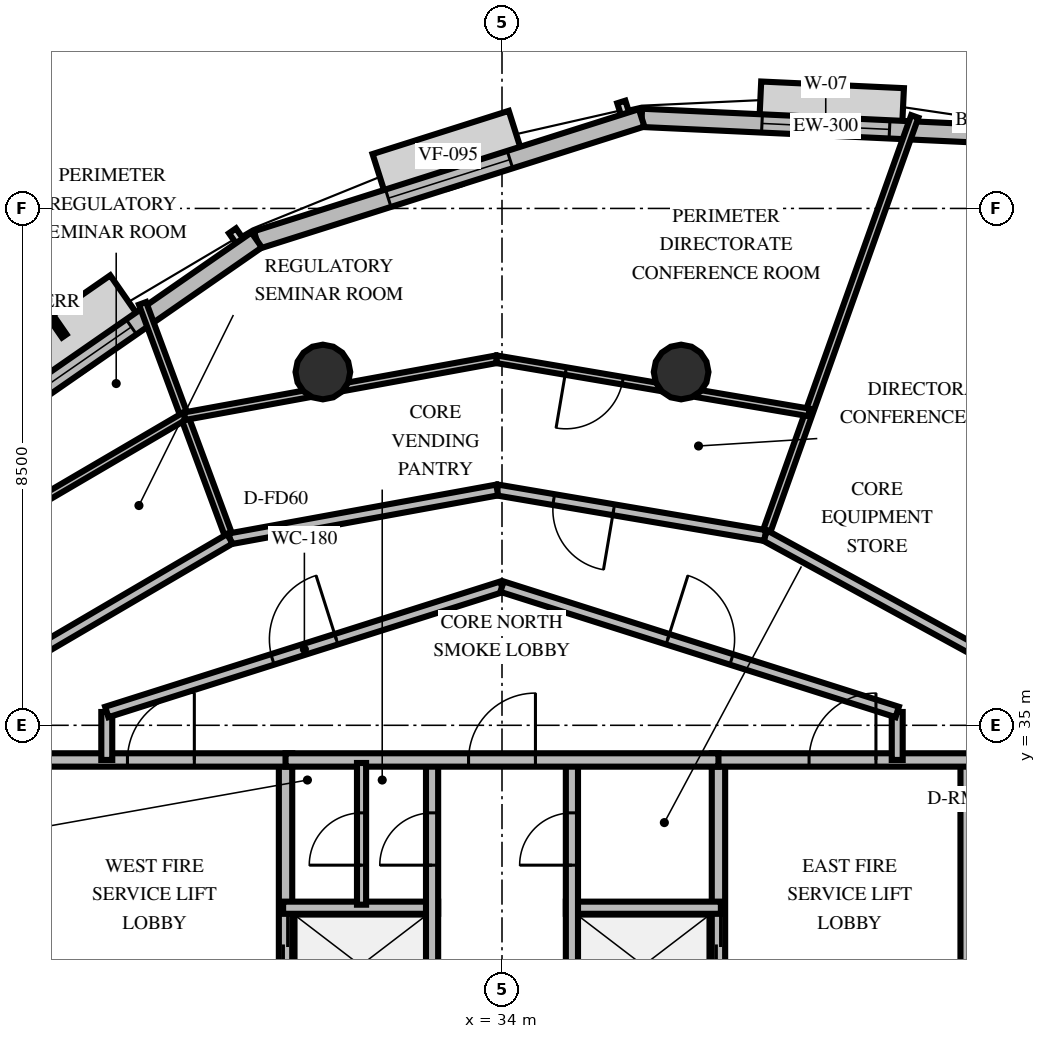
"""IFC4 building model, lengths in metres.
Left out: names, types, materials, properties, quantities, classifications, styles, units other than length and angle.
Written with IfcOpenShell. Run it as: python <this file> out.ifc"""

import sys

from ifc_helpers import new_model, si_unit, direction, frame, frame_2d, origin, origin_2d, place, context, subcontext, project, spatial, rectangle, circle, extrude, element, fill, save


model = new_model("IFC4")
c1 = context("Model", 3, precision=1e-05, world=origin(), true_north=direction((0.0, 1.0)))
c2 = subcontext(c1, "Body", "Model", "MODEL_VIEW")
j1 = project(units=[si_unit("LENGTHUNIT", "METRE"), si_unit("PLANEANGLEUNIT", "RADIAN")], contexts=[c1])
p1 = place(None, origin())
s1 = spatial("IfcSite", under=j1, at=p1, CompositionType="ELEMENT")
p2 = place(p1, origin())
s2 = spatial("IfcBuilding", under=s1, at=p2, CompositionType="ELEMENT")
p3 = place(p2, frame((0.0, 0.0, 241.2)))
s3 = spatial("IfcBuildingStorey", under=s2, at=p3, CompositionType="ELEMENT", Elevation=241.2)
for number, where, z_axis, x_axis in (
    (1, (36.946, 40.81, 0.0), (0.0, 0.0, 1.0), (1.0, 0.0, 0.0)),
    (2, (31.054, 40.81, 0.0), (0.0, 0.0, 1.0), (1.0, 0.0, 0.0)),
):
    element("IfcColumn", number, at=place(p3, frame(where, z_axis=z_axis, x_axis=x_axis)), inside=s3, PredefinedType="COLUMN", context=c2, shape_type="SweptSolid", body=[
        extrude(circle(Radius=0.45, at=origin_2d()), origin(), (0.0, 0.0, 1.0), 3.6),
    ])
p4 = place(p3, frame((42.352, 44.708, 0.0), z_axis=(0.0, 0.0, 1.0), x_axis=(-0.998917432733, 0.046518411209, 0.0)))
e3 = element("IfcWall", 3, at=p4, inside=s3, PredefinedType="SOLIDWALL", context=c2, shape_type="SweptSolid", body=[
    extrude(rectangle(XDim=6.062, YDim=0.3, at=frame_2d((3.031, 0.0))), origin(), (0.0, 0.0, 1.0), 2.76),
])
p5 = place(p4, frame((1.981, 0.0, 0.8)))
e4 = element("IfcOpeningElement", 4, at=p5, cuts=e3, PredefinedType="OPENING", context=c2, shape_type="SweptSolid", body=[
    extrude(rectangle(XDim=2.1, YDim=1.85, at=frame_2d((1.05, 0.925))), frame((0.0, 0.16, 0.0), z_axis=(0.0, -1.0, 0.0), x_axis=(1.0, 0.0, 0.0)), (0.0, 0.0, 1.0), 0.32),
])
p6 = place(p3, frame((36.297, 44.99, 0.0), z_axis=(0.0, 0.0, 1.0), x_axis=(-0.953208683958, -0.302313090729, 0.0)))
e5 = element("IfcWall", 5, at=p6, inside=s3, PredefinedType="SOLIDWALL", context=c2, shape_type="SweptSolid", body=[
    extrude(rectangle(XDim=6.643, YDim=0.3, at=frame_2d((3.322, 0.0))), origin(), (0.0, 0.0, 1.0), 2.76),
])
p7 = place(p6, frame((2.272, 0.0, 0.8)))
e6 = element("IfcOpeningElement", 6, at=p7, cuts=e5, PredefinedType="OPENING", context=c2, shape_type="SweptSolid", body=[
    extrude(rectangle(XDim=2.1, YDim=1.85, at=frame_2d((1.05, 0.925))), frame((0.0, 0.16, 0.0), z_axis=(0.0, -1.0, 0.0), x_axis=(1.0, 0.0, 0.0)), (0.0, 0.0, 1.0), 0.32),
])
p8 = place(p3, frame((29.965, 42.981, 0.0), z_axis=(0.0, 0.0, 1.0), x_axis=(-0.821575322213, -0.570099982399, 0.0)))
e7 = element("IfcWall", 7, at=p8, inside=s3, PredefinedType="SOLIDWALL", context=c2, shape_type="SweptSolid", body=[
    extrude(rectangle(XDim=7.115, YDim=0.3, at=frame_2d((3.558, 0.0))), origin(), (0.0, 0.0, 1.0), 2.76),
])
p9 = place(p8, frame((2.508, 0.0, 0.8)))
e8 = element("IfcOpeningElement", 8, at=p9, cuts=e7, PredefinedType="OPENING", context=c2, shape_type="SweptSolid", body=[
    extrude(rectangle(XDim=2.1, YDim=1.85, at=frame_2d((1.05, 0.925))), frame((0.0, 0.16, 0.0), z_axis=(0.0, -1.0, 0.0), x_axis=(1.0, 0.0, 0.0)), (0.0, 0.0, 1.0), 0.32),
])
p10 = place(p3, frame((30.44, 30.05, 0.0), z_axis=(0.0, 0.0, 1.0), x_axis=(0.0, 1.0, 0.0)))
e9 = element("IfcWall", 9, at=p10, inside=s3, PredefinedType="SOLIDWALL", context=c2, shape_type="SweptSolid", body=[
    extrude(rectangle(XDim=4.38, YDim=0.22, at=frame_2d((2.19, 0.0))), origin(), (0.0, 0.0, 1.0), 2.46),
])
p11 = place(p10, frame((0.8, 0.0, 0.0)))
e10 = element("IfcOpeningElement", 10, at=p11, cuts=e9, PredefinedType="OPENING", context=c2, shape_type="SweptSolid", body=[
    extrude(rectangle(XDim=1.05, YDim=2.1, at=frame_2d((0.525, 1.05))), frame((0.0, 0.12, 0.0), z_axis=(0.0, -1.0, 0.0), x_axis=(1.0, 0.0, 0.0)), (0.0, 0.0, 1.0), 0.24),
])
p12 = place(p3, frame((26.24, 34.43, 0.0), z_axis=(0.0, 0.0, 1.0), x_axis=(1.0, 0.0, 0.0)))
e11 = element("IfcWall", 11, at=p12, inside=s3, PredefinedType="SOLIDWALL", context=c2, shape_type="SweptSolid", body=[
    extrude(rectangle(XDim=4.31, YDim=0.22, at=frame_2d((2.155, 0.0))), origin(), (0.0, 0.0, 1.0), 2.46),
])
p13 = place(p12, frame((1.6, 0.0, 0.0)))
e12 = element("IfcOpeningElement", 12, at=p13, cuts=e11, PredefinedType="OPENING", context=c2, shape_type="SweptSolid", body=[
    extrude(rectangle(XDim=1.1, YDim=2.15, at=frame_2d((0.55, 1.075))), frame((0.0, 0.12, 0.0), z_axis=(0.0, -1.0, 0.0), x_axis=(1.0, 0.0, 0.0)), (0.0, 0.0, 1.0), 0.24),
])
p14 = place(p3, frame((30.4, 32.0, 0.0), z_axis=(0.0, 0.0, 1.0), x_axis=(1.0, 0.0, 0.0)))
e13 = element("IfcWall", 13, at=p14, inside=s3, PredefinedType="SOLIDWALL", context=c2, shape_type="SweptSolid", body=[
    extrude(rectangle(XDim=2.55, YDim=0.2, at=frame_2d((1.275, 0.0))), origin(), (0.0, 0.0, 1.0), 2.46),
])
p15 = place(p3, frame((32.85, 30.05, 0.0), z_axis=(0.0, 0.0, 1.0), x_axis=(0.0, 1.0, 0.0)))
e14 = element("IfcWall", 14, at=p15, inside=s3, PredefinedType="SOLIDWALL", context=c2, shape_type="SweptSolid", body=[
    extrude(rectangle(XDim=4.38, YDim=0.2, at=frame_2d((2.19, 0.0))), origin(), (0.0, 0.0, 1.0), 2.46),
])
p16 = place(p15, frame((2.65, 0.0, 0.0)))
e15 = element("IfcOpeningElement", 15, at=p16, cuts=e14, PredefinedType="OPENING", context=c2, shape_type="SweptSolid", body=[
    extrude(rectangle(XDim=0.86, YDim=2.05, at=frame_2d((0.43, 1.025))), frame((0.0, 0.11, 0.0), z_axis=(0.0, -1.0, 0.0), x_axis=(1.0, 0.0, 0.0)), (0.0, 0.0, 1.0), 0.22),
])
p17 = place(p3, frame((37.56, 30.05, 0.0), z_axis=(0.0, 0.0, 1.0), x_axis=(0.0, 1.0, 0.0)))
e16 = element("IfcWall", 16, at=p17, inside=s3, PredefinedType="SOLIDWALL", context=c2, shape_type="SweptSolid", body=[
    extrude(rectangle(XDim=4.38, YDim=0.22, at=frame_2d((2.19, 0.0))), origin(), (0.0, 0.0, 1.0), 2.46),
])
p18 = place(p17, frame((0.8, 0.0, 0.0)))
e17 = element("IfcOpeningElement", 17, at=p18, cuts=e16, PredefinedType="OPENING", context=c2, shape_type="SweptSolid", body=[
    extrude(rectangle(XDim=1.05, YDim=2.1, at=frame_2d((0.525, 1.05))), frame((0.0, 0.12, 0.0), z_axis=(0.0, -1.0, 0.0), x_axis=(1.0, 0.0, 0.0)), (0.0, 0.0, 1.0), 0.24),
])
p19 = place(p3, frame((41.65, 30.05, 0.0), z_axis=(0.0, 0.0, 1.0), x_axis=(0.0, 1.0, 0.0)))
e18 = element("IfcWall", 18, at=p19, inside=s3, PredefinedType="SOLIDWALL", context=c2, shape_type="SweptSolid", body=[
    extrude(rectangle(XDim=4.38, YDim=0.22, at=frame_2d((2.19, 0.0))), origin(), (0.0, 0.0, 1.0), 2.46),
])
p20 = place(p3, frame((37.45, 34.43, 0.0), z_axis=(0.0, 0.0, 1.0), x_axis=(1.0, 0.0, 0.0)))
e19 = element("IfcWall", 19, at=p20, inside=s3, PredefinedType="SOLIDWALL", context=c2, shape_type="SweptSolid", body=[
    extrude(rectangle(XDim=4.31, YDim=0.22, at=frame_2d((2.155, 0.0))), origin(), (0.0, 0.0, 1.0), 2.46),
])
p21 = place(p20, frame((1.6, 0.0, 0.0)))
e20 = element("IfcOpeningElement", 20, at=p21, cuts=e19, PredefinedType="OPENING", context=c2, shape_type="SweptSolid", body=[
    extrude(rectangle(XDim=1.1, YDim=2.15, at=frame_2d((0.55, 1.075))), frame((0.0, 0.12, 0.0), z_axis=(0.0, -1.0, 0.0), x_axis=(1.0, 0.0, 0.0)), (0.0, 0.0, 1.0), 0.24),
])
p22 = place(p3, frame((35.05, 32.0, 0.0), z_axis=(0.0, 0.0, 1.0), x_axis=(1.0, 0.0, 0.0)))
e21 = element("IfcWall", 21, at=p22, inside=s3, PredefinedType="SOLIDWALL", context=c2, shape_type="SweptSolid", body=[
    extrude(rectangle(XDim=2.55, YDim=0.2, at=frame_2d((1.275, 0.0))), origin(), (0.0, 0.0, 1.0), 2.46),
])
p23 = place(p3, frame((35.15, 30.05, 0.0), z_axis=(0.0, 0.0, 1.0), x_axis=(0.0, 1.0, 0.0)))
e22 = element("IfcWall", 22, at=p23, inside=s3, PredefinedType="SOLIDWALL", context=c2, shape_type="SweptSolid", body=[
    extrude(rectangle(XDim=4.38, YDim=0.2, at=frame_2d((2.19, 0.0))), origin(), (0.0, 0.0, 1.0), 2.46),
])
p24 = place(p23, frame((2.65, 0.0, 0.0)))
e23 = element("IfcOpeningElement", 23, at=p24, cuts=e22, PredefinedType="OPENING", context=c2, shape_type="SweptSolid", body=[
    extrude(rectangle(XDim=0.86, YDim=2.05, at=frame_2d((0.43, 1.025))), frame((0.0, 0.11, 0.0), z_axis=(0.0, -1.0, 0.0), x_axis=(1.0, 0.0, 0.0)), (0.0, 0.0, 1.0), 0.22),
])
p25 = place(p3, frame((30.44, 34.43, 0.0), z_axis=(0.0, 0.0, 1.0), x_axis=(1.0, 0.0, 0.0)))
e24 = element("IfcWall", 24, at=p25, inside=s3, PredefinedType="SOLIDWALL", context=c2, shape_type="SweptSolid", body=[
    extrude(rectangle(XDim=7.12, YDim=0.22, at=frame_2d((3.56, 0.0))), origin(), (0.0, 0.0, 1.0), 2.46),
])
p26 = place(p25, frame((3.01, 0.0, 0.0)))
e25 = element("IfcOpeningElement", 25, at=p26, cuts=e24, PredefinedType="OPENING", context=c2, shape_type="SweptSolid", body=[
    extrude(rectangle(XDim=1.1, YDim=2.15, at=frame_2d((0.55, 1.075))), frame((0.0, 0.12, 0.0), z_axis=(0.0, -1.0, 0.0), x_axis=(1.0, 0.0, 0.0)), (0.0, 0.0, 1.0), 0.24),
])
p27 = place(p3, frame((31.69, 32.05, 0.0), z_axis=(0.0, 0.0, 1.0), x_axis=(0.0, 1.0, 0.0)))
e26 = element("IfcWall", 26, at=p27, inside=s3, PredefinedType="PARTITIONING", context=c2, shape_type="SweptSolid", body=[
    extrude(rectangle(XDim=2.33, YDim=0.15, at=frame_2d((1.165, 0.0))), origin(), (0.0, 0.0, 1.0), 2.46),
])
p28 = place(p27, frame((0.65, 0.0, 0.0)))
e27 = element("IfcOpeningElement", 27, at=p28, cuts=e26, PredefinedType="OPENING", context=c2, shape_type="SweptSolid", body=[
    extrude(rectangle(XDim=0.86, YDim=2.05, at=frame_2d((0.43, 1.025))), frame((0.0, 0.085, 0.0), z_axis=(0.0, -1.0, 0.0), x_axis=(1.0, 0.0, 0.0)), (0.0, 0.0, 1.0), 0.17),
])
for number, where, z_axis, x_axis in (
    (28, (27.5, 34.43, 0.0), (0.0, 0.0, 1.0), (0.0, 1.0, 0.0)),
    (29, (40.5, 35.219, 0.0), (0.0, 0.0, 1.0), (0.0, -1.0, 0.0)),
):
    element("IfcWall", number, at=place(p3, frame(where, z_axis=z_axis, x_axis=x_axis)), inside=s3, PredefinedType="PARTITIONING", context=c2, shape_type="SweptSolid", body=[
        extrude(rectangle(XDim=0.789, YDim=0.18, at=frame_2d((0.395, 0.0))), origin(), (0.0, 0.0, 1.0), 2.46),
    ])
p29 = place(p3, frame((27.5, 35.219, 0.0), z_axis=(0.0, 0.0, 1.0), x_axis=(0.953228121756, 0.302251795518, 0.0)))
e30 = element("IfcWall", 30, at=p29, inside=s3, PredefinedType="PARTITIONING", context=c2, shape_type="SweptSolid", body=[
    extrude(rectangle(XDim=6.819, YDim=0.18, at=frame_2d((3.409, 0.0))), origin(), (0.0, 0.0, 1.0), 2.46),
])
p30 = place(p29, frame((2.86, 0.0, 0.0)))
e31 = element("IfcOpeningElement", 31, at=p30, cuts=e30, PredefinedType="OPENING", context=c2, shape_type="SweptSolid", body=[
    extrude(rectangle(XDim=1.1, YDim=2.15, at=frame_2d((0.55, 1.075))), frame((0.0, 0.1, 0.0), z_axis=(0.0, -1.0, 0.0), x_axis=(1.0, 0.0, 0.0)), (0.0, 0.0, 1.0), 0.2),
])
p31 = place(p3, frame((34.0, 37.28, 0.0), z_axis=(0.0, 0.0, 1.0), x_axis=(0.953228121756, -0.302251795518, 0.0)))
e32 = element("IfcWall", 32, at=p31, inside=s3, PredefinedType="PARTITIONING", context=c2, shape_type="SweptSolid", body=[
    extrude(rectangle(XDim=6.819, YDim=0.18, at=frame_2d((3.409, 0.0))), origin(), (0.0, 0.0, 1.0), 2.46),
])
p32 = place(p31, frame((2.86, 0.0, 0.0)))
e33 = element("IfcOpeningElement", 33, at=p32, cuts=e32, PredefinedType="OPENING", context=c2, shape_type="SweptSolid", body=[
    extrude(rectangle(XDim=1.1, YDim=2.15, at=frame_2d((0.55, 1.075))), frame((0.0, 0.1, 0.0), z_axis=(0.0, -1.0, 0.0), x_axis=(1.0, 0.0, 0.0)), (0.0, 0.0, 1.0), 0.2),
])
p33 = place(p3, frame((38.328, 38.121, 0.0), z_axis=(0.0, 0.0, 1.0), x_axis=(0.33628356157, 0.941760779719, 0.0)))
e34 = element("IfcWall", 34, at=p33, inside=s3, PredefinedType="PARTITIONING", context=c2, shape_type="SweptSolid", body=[
    extrude(rectangle(XDim=7.318, YDim=0.125, at=frame_2d((3.659, 0.0))), origin(), (0.0, 0.0, 1.0), 2.46),
])
p34 = place(p3, frame((41.862, 36.19, 0.0), z_axis=(0.0, 0.0, 1.0), x_axis=(-0.877561700538, 0.47946372308, 0.0)))
e35 = element("IfcWall", 35, at=p34, inside=s3, PredefinedType="PARTITIONING", context=c2, shape_type="SweptSolid", body=[
    extrude(rectangle(XDim=4.027, YDim=0.18, at=frame_2d((2.013, 0.0))), origin(), (0.0, 0.0, 1.0), 2.46),
])
p35 = place(p3, frame((29.524, 38.067, 0.0), z_axis=(0.0, 0.0, 1.0), x_axis=(-0.347726358712, 0.937596064122, 0.0)))
e36 = element("IfcWall", 36, at=p35, inside=s3, PredefinedType="PARTITIONING", context=c2, shape_type="SweptSolid", body=[
    extrude(rectangle(XDim=4.13, YDim=0.125, at=frame_2d((2.065, 0.0))), origin(), (0.0, 0.0, 1.0), 2.46),
])
p36 = place(p3, frame((38.328, 38.121, 0.0), z_axis=(0.0, 0.0, 1.0), x_axis=(-0.985849799471, 0.167631061808, 0.0)))
e37 = element("IfcWall", 37, at=p36, inside=s3, PredefinedType="PARTITIONING", context=c2, shape_type="SweptSolid", body=[
    extrude(rectangle(XDim=4.47, YDim=0.18, at=frame_2d((2.235, 0.0))), origin(), (0.0, 0.0, 1.0), 2.46),
])
p37 = place(p36, frame((2.527, 0.0, 0.0)))
e38 = element("IfcOpeningElement", 38, at=p37, cuts=e37, PredefinedType="OPENING", context=c2, shape_type="SweptSolid", body=[
    extrude(rectangle(XDim=1.0, YDim=2.15, at=frame_2d((0.5, 1.075))), frame((0.0, 0.1, 0.0), z_axis=(0.0, -1.0, 0.0), x_axis=(1.0, 0.0, 0.0)), (0.0, 0.0, 1.0), 0.2),
])
p38 = place(p3, frame((33.921, 38.87, 0.0), z_axis=(0.0, 0.0, 1.0), x_axis=(-0.983721002142, -0.179702504, 0.0)))
e39 = element("IfcWall", 39, at=p38, inside=s3, PredefinedType="PARTITIONING", context=c2, shape_type="SweptSolid", body=[
    extrude(rectangle(XDim=4.47, YDim=0.18, at=frame_2d((2.235, 0.0))), origin(), (0.0, 0.0, 1.0), 2.46),
])
p39 = place(p3, frame((39.051, 40.145, 0.0), z_axis=(0.0, 0.0, 1.0), x_axis=(-0.985847184463, 0.167646440123, 0.0)))
e40 = element("IfcWall", 40, at=p39, inside=s3, PredefinedType="PARTITIONING", context=c2, shape_type="SweptSolid", body=[
    extrude(rectangle(XDim=5.216, YDim=0.125, at=frame_2d((2.608, 0.0))), origin(), (0.0, 0.0, 1.0), 2.46),
])
p40 = place(p39, frame((3.11, 0.0, 0.0)))
e41 = element("IfcOpeningElement", 41, at=p40, cuts=e40, PredefinedType="OPENING", context=c2, shape_type="SweptSolid", body=[
    extrude(rectangle(XDim=0.95, YDim=2.15, at=frame_2d((0.475, 1.075))), frame((0.0, 0.073, 0.0), z_axis=(0.0, -1.0, 0.0), x_axis=(1.0, 0.0, 0.0)), (0.0, 0.0, 1.0), 0.145),
])
p41 = place(p3, frame((33.908, 41.02, 0.0), z_axis=(0.0, 0.0, 1.0), x_axis=(-0.983726569389, -0.179672025305, 0.0)))
e42 = element("IfcWall", 42, at=p41, inside=s3, PredefinedType="PARTITIONING", context=c2, shape_type="SweptSolid", body=[
    extrude(rectangle(XDim=5.217, YDim=0.125, at=frame_2d((2.608, 0.0))), origin(), (0.0, 0.0, 1.0), 2.46),
])
p42 = place(p3, frame((29.524, 38.067, 0.0), z_axis=(0.0, 0.0, 1.0), x_axis=(-0.862971485052, -0.505252625909, 0.0)))
e43 = element("IfcWall", 43, at=p42, inside=s3, PredefinedType="PARTITIONING", context=c2, shape_type="SweptSolid", body=[
    extrude(rectangle(XDim=4.47, YDim=0.18, at=frame_2d((2.235, 0.0))), origin(), (0.0, 0.0, 1.0), 2.46),
])
p43 = place(p3, frame((28.777, 40.083, 0.0), z_axis=(0.0, 0.0, 1.0), x_axis=(-0.862952750204, -0.505284623668, 0.0)))
e44 = element("IfcWall", 44, at=p43, inside=s3, PredefinedType="PARTITIONING", context=c2, shape_type="SweptSolid", body=[
    extrude(rectangle(XDim=5.216, YDim=0.125, at=frame_2d((2.608, 0.0))), origin(), (0.0, 0.0, 1.0), 2.46),
])
p44 = place(p5, origin())
e45 = element("IfcWindow", 45, at=p44, inside=s3, PartitioningType="SINGLE_PANEL", PredefinedType="WINDOW", context=c2, shape_type="SweptSolid", body=[
    extrude(rectangle(XDim=2.1, YDim=1.85, at=frame_2d((1.05, 0.925))), frame((0.0, 0.03, 0.0), z_axis=(0.0, -1.0, 0.0), x_axis=(1.0, 0.0, 0.0)), (0.0, 0.0, 1.0), 0.06),
])
fill(e4, e45)
p45 = place(p7, origin())
e46 = element("IfcWindow", 46, at=p45, inside=s3, PartitioningType="SINGLE_PANEL", PredefinedType="WINDOW", context=c2, shape_type="SweptSolid", body=[
    extrude(rectangle(XDim=2.1, YDim=1.85, at=frame_2d((1.05, 0.925))), frame((0.0, 0.03, 0.0), z_axis=(0.0, -1.0, 0.0), x_axis=(1.0, 0.0, 0.0)), (0.0, 0.0, 1.0), 0.06),
])
fill(e6, e46)
p46 = place(p9, origin())
e47 = element("IfcWindow", 47, at=p46, inside=s3, PartitioningType="SINGLE_PANEL", PredefinedType="WINDOW", context=c2, shape_type="SweptSolid", body=[
    extrude(rectangle(XDim=2.1, YDim=1.85, at=frame_2d((1.05, 0.925))), frame((0.0, 0.03, 0.0), z_axis=(0.0, -1.0, 0.0), x_axis=(1.0, 0.0, 0.0)), (0.0, 0.0, 1.0), 0.06),
])
fill(e8, e47)
p47 = place(p13, origin())
e48 = element("IfcDoor", 48, at=p47, inside=s3, OperationType="SINGLE_SWING_RIGHT", PredefinedType="DOOR", context=c2, shape_type="SweptSolid", body=[
    extrude(rectangle(XDim=1.1, YDim=2.15, at=frame_2d((0.55, 1.075))), frame((0.0, 0.025, 0.0), z_axis=(0.0, -1.0, 0.0), x_axis=(1.0, 0.0, 0.0)), (0.0, 0.0, 1.0), 0.05),
])
fill(e12, e48)
p48 = place(p11, origin())
e49 = element("IfcDoor", 49, at=p48, inside=s3, OperationType="DOUBLE_DOOR_SLIDING", PredefinedType="USERDEFINED", context=c2, shape_type="SweptSolid", body=[
    extrude(rectangle(XDim=1.05, YDim=2.1, at=frame_2d((0.525, 1.05))), frame((0.0, 0.025, 0.0), z_axis=(0.0, -1.0, 0.0), x_axis=(1.0, 0.0, 0.0)), (0.0, 0.0, 1.0), 0.05),
])
fill(e10, e49)
p49 = place(p16, origin())
e50 = element("IfcDoor", 50, at=p49, inside=s3, OperationType="SINGLE_SWING_LEFT", PredefinedType="TRAPDOOR", context=c2, shape_type="SweptSolid", body=[
    extrude(rectangle(XDim=0.86, YDim=2.05, at=frame_2d((0.43, 1.025))), frame((0.0, 0.025, 0.0), z_axis=(0.0, -1.0, 0.0), x_axis=(1.0, 0.0, 0.0)), (0.0, 0.0, 1.0), 0.05),
])
fill(e15, e50)
p50 = place(p21, origin())
e51 = element("IfcDoor", 51, at=p50, inside=s3, OperationType="SINGLE_SWING_RIGHT", PredefinedType="DOOR", context=c2, shape_type="SweptSolid", body=[
    extrude(rectangle(XDim=1.1, YDim=2.15, at=frame_2d((0.55, 1.075))), frame((0.0, 0.025, 0.0), z_axis=(0.0, -1.0, 0.0), x_axis=(1.0, 0.0, 0.0)), (0.0, 0.0, 1.0), 0.05),
])
fill(e20, e51)
p51 = place(p18, origin())
e52 = element("IfcDoor", 52, at=p51, inside=s3, OperationType="DOUBLE_DOOR_SLIDING", PredefinedType="USERDEFINED", context=c2, shape_type="SweptSolid", body=[
    extrude(rectangle(XDim=1.05, YDim=2.1, at=frame_2d((0.525, 1.05))), frame((0.0, 0.025, 0.0), z_axis=(0.0, -1.0, 0.0), x_axis=(1.0, 0.0, 0.0)), (0.0, 0.0, 1.0), 0.05),
])
fill(e17, e52)
p52 = place(p24, origin())
e53 = element("IfcDoor", 53, at=p52, inside=s3, OperationType="SINGLE_SWING_LEFT", PredefinedType="TRAPDOOR", context=c2, shape_type="SweptSolid", body=[
    extrude(rectangle(XDim=0.86, YDim=2.05, at=frame_2d((0.43, 1.025))), frame((0.0, 0.025, 0.0), z_axis=(0.0, -1.0, 0.0), x_axis=(1.0, 0.0, 0.0)), (0.0, 0.0, 1.0), 0.05),
])
fill(e23, e53)
p53 = place(p26, origin())
e54 = element("IfcDoor", 54, at=p53, inside=s3, OperationType="SINGLE_SWING_RIGHT", PredefinedType="DOOR", context=c2, shape_type="SweptSolid", body=[
    extrude(rectangle(XDim=1.1, YDim=2.15, at=frame_2d((0.55, 1.075))), frame((0.0, 0.025, 0.0), z_axis=(0.0, -1.0, 0.0), x_axis=(1.0, 0.0, 0.0)), (0.0, 0.0, 1.0), 0.05),
])
fill(e25, e54)
p54 = place(p28, origin())
e55 = element("IfcDoor", 55, at=p54, inside=s3, OperationType="SINGLE_SWING_LEFT", PredefinedType="TRAPDOOR", context=c2, shape_type="SweptSolid", body=[
    extrude(rectangle(XDim=0.86, YDim=2.05, at=frame_2d((0.43, 1.025))), frame((0.0, 0.025, 0.0), z_axis=(0.0, -1.0, 0.0), x_axis=(1.0, 0.0, 0.0)), (0.0, 0.0, 1.0), 0.05),
])
fill(e27, e55)
p55 = place(p30, origin())
e56 = element("IfcDoor", 56, at=p55, inside=s3, OperationType="SINGLE_SWING_RIGHT", PredefinedType="DOOR", context=c2, shape_type="SweptSolid", body=[
    extrude(rectangle(XDim=1.1, YDim=2.15, at=frame_2d((0.55, 1.075))), frame((0.0, 0.025, 0.0), z_axis=(0.0, -1.0, 0.0), x_axis=(1.0, 0.0, 0.0)), (0.0, 0.0, 1.0), 0.05),
])
fill(e31, e56)
p56 = place(p32, origin())
e57 = element("IfcDoor", 57, at=p56, inside=s3, OperationType="SINGLE_SWING_LEFT", PredefinedType="DOOR", context=c2, shape_type="SweptSolid", body=[
    extrude(rectangle(XDim=1.1, YDim=2.15, at=frame_2d((0.55, 1.075))), frame((0.0, 0.025, 0.0), z_axis=(0.0, -1.0, 0.0), x_axis=(1.0, 0.0, 0.0)), (0.0, 0.0, 1.0), 0.05),
])
fill(e33, e57)
p57 = place(p37, origin())
e58 = element("IfcDoor", 58, at=p57, inside=s3, OperationType="SINGLE_SWING_LEFT", PredefinedType="DOOR", context=c2, shape_type="SweptSolid", body=[
    extrude(rectangle(XDim=1.0, YDim=2.15, at=frame_2d((0.5, 1.075))), frame((0.0, 0.025, 0.0), z_axis=(0.0, -1.0, 0.0), x_axis=(1.0, 0.0, 0.0)), (0.0, 0.0, 1.0), 0.05),
])
fill(e38, e58)
p58 = place(p40, origin())
e59 = element("IfcDoor", 59, at=p58, inside=s3, OperationType="SINGLE_SWING_RIGHT", PredefinedType="DOOR", context=c2, shape_type="SweptSolid", body=[
    extrude(rectangle(XDim=0.95, YDim=2.15, at=frame_2d((0.475, 1.075))), frame((0.0, 0.025, 0.0), z_axis=(0.0, -1.0, 0.0), x_axis=(1.0, 0.0, 0.0)), (0.0, 0.0, 1.0), 0.05),
])
fill(e41, e59)
save(model, sys.argv[1])
